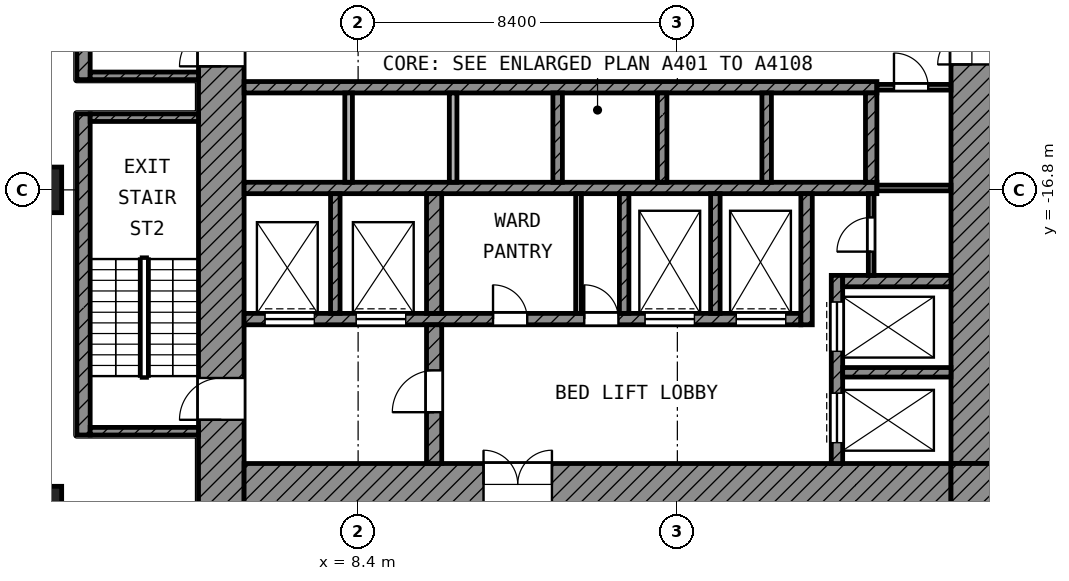
"""IFC4 building model, lengths in metres.
Left out: names, types, materials, properties, quantities, classifications, styles, units other than length and angle.
Written with IfcOpenShell. Run it as: python <this file> out.ifc"""

import sys

from ifc_helpers import new_model, si_unit, direction, frame, frame_2d, origin, origin_2d, place, context, subcontext, project, spatial, rectangle, extrude, element, fill, save


model = new_model("IFC4")
c1 = context("Model", 3, precision=1e-05, world=origin(), true_north=direction((0.0, 1.0)))
c2 = subcontext(c1, "Body", "Model", "MODEL_VIEW")
j1 = project(units=[si_unit("LENGTHUNIT", "METRE"), si_unit("PLANEANGLEUNIT", "RADIAN")], contexts=[c1])
p1 = place(None, origin())
s1 = spatial("IfcSite", under=j1, at=p1, CompositionType="ELEMENT")
p2 = place(p1, origin())
s2 = spatial("IfcBuilding", under=s1, at=p2, CompositionType="ELEMENT")
p3 = place(p2, frame((0.0, 0.0, 51.8)))
s3 = spatial("IfcBuildingStorey", under=s2, at=p3, CompositionType="ELEMENT", Elevation=51.8)
for number, where, z_axis, x_axis in (
    (1, (0.0, -16.8, 0.0), (0.0, 0.0, 1.0), (1.0, 0.0, 0.0)),
    (2, (0.0, -25.2, 0.0), (0.0, 0.0, 1.0), (1.0, 0.0, 0.0)),
):
    element("IfcColumn", number, at=place(p3, frame(where, z_axis=z_axis, x_axis=x_axis)), inside=s3, PredefinedType="COLUMN", context=c2, shape_type="SweptSolid", body=[
        extrude(rectangle(XDim=1.2, YDim=1.2, at=origin_2d()), origin(), (0.0, 0.0, 1.0), 4.2),
    ])
p4 = place(p3, frame((4.8, -25.1, 0.0), z_axis=(0.0, 0.0, 1.0), x_axis=(0.0, 1.0, 0.0)))
e3 = element("IfcWall", 3, at=p4, inside=s3, PredefinedType="SHEAR", context=c2, shape_type="SweptSolid", body=[
    extrude(rectangle(XDim=19.7, YDim=1.2, at=frame_2d((9.85, 0.0))), origin(), (0.0, 0.0, 1.0), 3.9),
])
p5 = place(p4, frame((11.55, 0.0, 0.0)))
e4 = element("IfcOpeningElement", 4, at=p5, cuts=e3, PredefinedType="OPENING", context=c2, shape_type="SweptSolid", body=[
    extrude(rectangle(XDim=1.1, YDim=2.1, at=frame_2d((0.55, 1.05))), frame((0.0, 0.61, 0.0), z_axis=(0.0, -1.0, 0.0), x_axis=(1.0, 0.0, 0.0)), (0.0, 0.0, 1.0), 1.22),
])
p6 = place(p4, frame((2.25, 0.0, 0.0)))
e5 = element("IfcOpeningElement", 5, at=p6, cuts=e3, PredefinedType="OPENING", context=c2, shape_type="SweptSolid", body=[
    extrude(rectangle(XDim=1.1, YDim=2.1, at=frame_2d((0.55, 1.05))), frame((0.0, 0.61, 0.0), z_axis=(0.0, -1.0, 0.0), x_axis=(1.0, 0.0, 0.0)), (0.0, 0.0, 1.0), 1.22),
])
p7 = place(p3, frame((24.55, -24.0, 0.0), z_axis=(0.0, 0.0, 1.0), x_axis=(0.0, 1.0, 0.0)))
e6 = element("IfcWall", 6, at=p7, inside=s3, PredefinedType="SHEAR", context=c2, shape_type="SweptSolid", body=[
    extrude(rectangle(XDim=18.6, YDim=1.1, at=frame_2d((9.3, 0.0))), origin(), (0.0, 0.0, 1.0), 3.9),
])
p8 = place(p7, frame((10.5, 0.0, 0.0)))
e7 = element("IfcOpeningElement", 7, at=p8, cuts=e6, PredefinedType="OPENING", context=c2, shape_type="SweptSolid", body=[
    extrude(rectangle(XDim=1.8, YDim=2.1, at=frame_2d((0.9, 1.05))), frame((0.0, 0.56, 0.0), z_axis=(0.0, -1.0, 0.0), x_axis=(1.0, 0.0, 0.0)), (0.0, 0.0, 1.0), 1.12),
])
p9 = place(p3, frame((5.4, -24.55, 0.0), z_axis=(0.0, 0.0, 1.0), x_axis=(1.0, 0.0, 0.0)))
e8 = element("IfcWall", 8, at=p9, inside=s3, PredefinedType="SHEAR", context=c2, shape_type="SweptSolid", body=[
    extrude(rectangle(XDim=18.6, YDim=1.1, at=frame_2d((9.3, 0.0))), origin(), (0.0, 0.0, 1.0), 3.9),
])
p10 = place(p9, frame((6.3, 0.0, 0.0)))
e9 = element("IfcOpeningElement", 9, at=p10, cuts=e8, PredefinedType="OPENING", context=c2, shape_type="SweptSolid", body=[
    extrude(rectangle(XDim=1.8, YDim=2.1, at=frame_2d((0.9, 1.05))), frame((0.0, 0.56, 0.0), z_axis=(0.0, -1.0, 0.0), x_axis=(1.0, 0.0, 0.0)), (0.0, 0.0, 1.0), 1.12),
])
p11 = place(p3, frame((24.55, -25.1, 0.0), z_axis=(0.0, 0.0, 1.0), x_axis=(0.0, 1.0, 0.0)))
e10 = element("IfcWall", 10, at=p11, inside=s3, PredefinedType="SHEAR", context=c2, shape_type="SweptSolid", body=[
    extrude(rectangle(XDim=1.1, YDim=1.1, at=frame_2d((0.55, 0.0))), origin(), (0.0, 0.0, 1.0), 3.9),
])
for number, where, z_axis, x_axis in (
    (11, (5.4, -14.1, 0.0), (0.0, 0.0, 1.0), (1.0, 0.0, 0.0)),
    (12, (5.4, -16.75, 0.0), (0.0, 0.0, 1.0), (1.0, 0.0, 0.0)),
):
    element("IfcWall", number, at=place(p3, frame(where, z_axis=z_axis, x_axis=x_axis)), inside=s3, PredefinedType="SHEAR", context=c2, shape_type="SweptSolid", body=[
        extrude(rectangle(XDim=16.65, YDim=0.3, at=frame_2d((8.325, 0.0))), origin(), (0.0, 0.0, 1.0), 3.9),
    ])
p12 = place(p3, frame((5.4, -20.2, 0.0), z_axis=(0.0, 0.0, 1.0), x_axis=(1.0, 0.0, 0.0)))
e13 = element("IfcWall", 13, at=p12, inside=s3, PredefinedType="SHEAR", context=c2, shape_type="SweptSolid", body=[
    extrude(rectangle(XDim=14.65, YDim=0.3, at=frame_2d((7.325, 0.0))), origin(), (0.0, 0.0, 1.0), 3.9),
])
p13 = place(p12, frame((10.55, 0.0, 0.0)))
e14 = element("IfcOpeningElement", 14, at=p13, cuts=e13, PredefinedType="OPENING", context=c2, shape_type="SweptSolid", body=[
    extrude(rectangle(XDim=1.3, YDim=2.1, at=frame_2d((0.65, 1.05))), frame((0.0, 0.16, 0.0), z_axis=(0.0, -1.0, 0.0), x_axis=(1.0, 0.0, 0.0)), (0.0, 0.0, 1.0), 0.32),
])
p14 = place(p12, frame((12.95, 0.0, 0.0)))
e15 = element("IfcOpeningElement", 15, at=p14, cuts=e13, PredefinedType="OPENING", context=c2, shape_type="SweptSolid", body=[
    extrude(rectangle(XDim=1.3, YDim=2.1, at=frame_2d((0.65, 1.05))), frame((0.0, 0.16, 0.0), z_axis=(0.0, -1.0, 0.0), x_axis=(1.0, 0.0, 0.0)), (0.0, 0.0, 1.0), 0.32),
])
p15 = place(p12, frame((0.55, 0.0, 0.0)))
e16 = element("IfcOpeningElement", 16, at=p15, cuts=e13, PredefinedType="OPENING", context=c2, shape_type="SweptSolid", body=[
    extrude(rectangle(XDim=1.3, YDim=2.1, at=frame_2d((0.65, 1.05))), frame((0.0, 0.16, 0.0), z_axis=(0.0, -1.0, 0.0), x_axis=(1.0, 0.0, 0.0)), (0.0, 0.0, 1.0), 0.32),
])
p16 = place(p12, frame((2.95, 0.0, 0.0)))
e17 = element("IfcOpeningElement", 17, at=p16, cuts=e13, PredefinedType="OPENING", context=c2, shape_type="SweptSolid", body=[
    extrude(rectangle(XDim=1.3, YDim=2.1, at=frame_2d((0.65, 1.05))), frame((0.0, 0.16, 0.0), z_axis=(0.0, -1.0, 0.0), x_axis=(1.0, 0.0, 0.0)), (0.0, 0.0, 1.0), 0.32),
])
p17 = place(p12, frame((6.55, 0.0, 0.0)))
e18 = element("IfcOpeningElement", 18, at=p17, cuts=e13, PredefinedType="OPENING", context=c2, shape_type="SweptSolid", body=[
    extrude(rectangle(XDim=0.9, YDim=2.1, at=frame_2d((0.45, 1.05))), frame((0.0, 0.16, 0.0), z_axis=(0.0, -1.0, 0.0), x_axis=(1.0, 0.0, 0.0)), (0.0, 0.0, 1.0), 0.32),
])
p18 = place(p12, frame((8.95, 0.0, 0.0)))
e19 = element("IfcOpeningElement", 19, at=p18, cuts=e13, PredefinedType="OPENING", context=c2, shape_type="SweptSolid", body=[
    extrude(rectangle(XDim=0.9, YDim=2.1, at=frame_2d((0.45, 1.05))), frame((0.0, 0.16, 0.0), z_axis=(0.0, -1.0, 0.0), x_axis=(1.0, 0.0, 0.0)), (0.0, 0.0, 1.0), 0.32),
])
p19 = place(p3, frame((10.4, -24.0, 0.0), z_axis=(0.0, 0.0, 1.0), x_axis=(0.0, 1.0, 0.0)))
e20 = element("IfcWall", 20, at=p19, inside=s3, PredefinedType="SHEAR", context=c2, shape_type="SweptSolid", body=[
    extrude(rectangle(XDim=3.65, YDim=0.4, at=frame_2d((1.825, 0.0))), origin(), (0.0, 0.0, 1.0), 3.9),
])
p20 = place(p19, frame((1.35, 0.0, 0.0)))
e21 = element("IfcOpeningElement", 21, at=p20, cuts=e20, PredefinedType="OPENING", context=c2, shape_type="SweptSolid", body=[
    extrude(rectangle(XDim=1.1, YDim=2.1, at=frame_2d((0.55, 1.05))), frame((0.0, 0.21, 0.0), z_axis=(0.0, -1.0, 0.0), x_axis=(1.0, 0.0, 0.0)), (0.0, 0.0, 1.0), 0.42),
])
p21 = place(p3, frame((10.4, -20.05, 0.0), z_axis=(0.0, 0.0, 1.0), x_axis=(0.0, 1.0, 0.0)))
e22 = element("IfcWall", 22, at=p21, inside=s3, PredefinedType="SHEAR", context=c2, shape_type="SweptSolid", body=[
    extrude(rectangle(XDim=3.15, YDim=0.4, at=frame_2d((1.575, 0.0))), origin(), (0.0, 0.0, 1.0), 3.9),
])
p22 = place(p3, frame((20.2, -20.35, 0.0), z_axis=(0.0, 0.0, 1.0), x_axis=(0.0, 1.0, 0.0)))
e23 = element("IfcWall", 23, at=p22, inside=s3, PredefinedType="SHEAR", context=c2, shape_type="SweptSolid", body=[
    extrude(rectangle(XDim=3.45, YDim=0.3, at=frame_2d((1.725, 0.0))), origin(), (0.0, 0.0, 1.0), 3.9),
])
p23 = place(p3, frame((21.9, -16.6, 0.0), z_axis=(0.0, 0.0, 1.0), x_axis=(0.0, 1.0, 0.0)))
e24 = element("IfcWall", 24, at=p23, inside=s3, PredefinedType="SHEAR", context=c2, shape_type="SweptSolid", body=[
    extrude(rectangle(XDim=2.35, YDim=0.3, at=frame_2d((1.175, 0.0))), origin(), (0.0, 0.0, 1.0), 3.9),
])
p24 = place(p3, frame((21.15, -19.2, 0.0), z_axis=(0.0, 0.0, 1.0), x_axis=(1.0, 0.0, 0.0)))
e25 = element("IfcWall", 25, at=p24, inside=s3, PredefinedType="SHEAR", context=c2, shape_type="SweptSolid", body=[
    extrude(rectangle(XDim=2.85, YDim=0.3, at=frame_2d((1.425, 0.0))), origin(), (0.0, 0.0, 1.0), 3.9),
])
p25 = place(p3, frame((21.0, -24.0, 0.0), z_axis=(0.0, 0.0, 1.0), x_axis=(0.0, 1.0, 0.0)))
e26 = element("IfcWall", 26, at=p25, inside=s3, PredefinedType="SHEAR", context=c2, shape_type="SweptSolid", body=[
    extrude(rectangle(XDim=4.95, YDim=0.3, at=frame_2d((2.475, 0.0))), origin(), (0.0, 0.0, 1.0), 3.9),
])
p26 = place(p25, frame((2.95, 0.0, 0.0)))
e27 = element("IfcOpeningElement", 27, at=p26, cuts=e26, PredefinedType="OPENING", context=c2, shape_type="SweptSolid", body=[
    extrude(rectangle(XDim=1.3, YDim=2.1, at=frame_2d((0.65, 1.05))), frame((0.0, 0.16, 0.0), z_axis=(0.0, -1.0, 0.0), x_axis=(1.0, 0.0, 0.0)), (0.0, 0.0, 1.0), 0.32),
])
p27 = place(p25, frame((0.55, 0.0, 0.0)))
e28 = element("IfcOpeningElement", 28, at=p27, cuts=e26, PredefinedType="OPENING", context=c2, shape_type="SweptSolid", body=[
    extrude(rectangle(XDim=1.3, YDim=2.1, at=frame_2d((0.65, 1.05))), frame((0.0, 0.16, 0.0), z_axis=(0.0, -1.0, 0.0), x_axis=(1.0, 0.0, 0.0)), (0.0, 0.0, 1.0), 0.32),
])
p28 = place(p3, frame((21.15, -21.6, 0.0), z_axis=(0.0, 0.0, 1.0), x_axis=(1.0, 0.0, 0.0)))
e29 = element("IfcWall", 29, at=p28, inside=s3, PredefinedType="SHEAR", context=c2, shape_type="SweptSolid", body=[
    extrude(rectangle(XDim=2.85, YDim=0.25, at=frame_2d((1.425, 0.0))), origin(), (0.0, 0.0, 1.0), 3.9),
])
for number, where, z_axis, x_axis in (
    (30, (7.8, -20.05, 0.0), (0.0, 0.0, 1.0), (0.0, 1.0, 0.0)),
    (31, (15.4, -20.05, 0.0), (0.0, 0.0, 1.0), (0.0, 1.0, 0.0)),
    (32, (17.8, -20.05, 0.0), (0.0, 0.0, 1.0), (0.0, 1.0, 0.0)),
):
    element("IfcWall", number, at=place(p3, frame(where, z_axis=z_axis, x_axis=x_axis)), inside=s3, PredefinedType="SHEAR", context=c2, shape_type="SweptSolid", body=[
        extrude(rectangle(XDim=3.15, YDim=0.25, at=frame_2d((1.575, 0.0))), origin(), (0.0, 0.0, 1.0), 3.9),
    ])
for number, where, z_axis, x_axis in (
    (33, (8.15, -16.6, 0.0), (0.0, 0.0, 1.0), (0.0, 1.0, 0.0)),
    (34, (10.9, -16.6, 0.0), (0.0, 0.0, 1.0), (0.0, 1.0, 0.0)),
):
    element("IfcWall", number, at=place(p3, frame(where, z_axis=z_axis, x_axis=x_axis)), inside=s3, PredefinedType="PARTITIONING", context=c2, shape_type="SweptSolid", body=[
        extrude(rectangle(XDim=2.35, YDim=0.2, at=frame_2d((1.175, 0.0))), origin(), (0.0, 0.0, 1.0), 3.9),
    ])
for number, where, z_axis, x_axis in (
    (35, (13.65, -16.6, 0.0), (0.0, 0.0, 1.0), (0.0, 1.0, 0.0)),
    (36, (16.4, -16.6, 0.0), (0.0, 0.0, 1.0), (0.0, 1.0, 0.0)),
    (37, (19.15, -16.6, 0.0), (0.0, 0.0, 1.0), (0.0, 1.0, 0.0)),
):
    element("IfcWall", number, at=place(p3, frame(where, z_axis=z_axis, x_axis=x_axis)), inside=s3, PredefinedType="SHEAR", context=c2, shape_type="SweptSolid", body=[
        extrude(rectangle(XDim=2.35, YDim=0.25, at=frame_2d((1.175, 0.0))), origin(), (0.0, 0.0, 1.0), 3.9),
    ])
p29 = place(p3, frame((21.9, -19.05, 0.0), z_axis=(0.0, 0.0, 1.0), x_axis=(0.0, 1.0, 0.0)))
e38 = element("IfcWall", 38, at=p29, inside=s3, PredefinedType="PARTITIONING", context=c2, shape_type="SweptSolid", body=[
    extrude(rectangle(XDim=2.15, YDim=0.15, at=frame_2d((1.075, 0.0))), origin(), (0.0, 0.0, 1.0), 3.9),
])
p30 = place(p29, frame((0.625, 0.0, 0.0)))
e39 = element("IfcOpeningElement", 39, at=p30, cuts=e38, PredefinedType="OPENING", context=c2, shape_type="SweptSolid", body=[
    extrude(rectangle(XDim=0.9, YDim=2.1, at=frame_2d((0.45, 1.05))), frame((0.0, 0.085, 0.0), z_axis=(0.0, -1.0, 0.0), x_axis=(1.0, 0.0, 0.0)), (0.0, 0.0, 1.0), 0.17),
])
p31 = place(p3, frame((22.05, -16.75, 0.0), z_axis=(0.0, 0.0, 1.0), x_axis=(1.0, 0.0, 0.0)))
e40 = element("IfcWall", 40, at=p31, inside=s3, PredefinedType="PARTITIONING", context=c2, shape_type="SweptSolid", body=[
    extrude(rectangle(XDim=1.95, YDim=0.15, at=frame_2d((0.975, 0.0))), origin(), (0.0, 0.0, 1.0), 3.9),
])
p32 = place(p3, frame((22.05, -14.1, 0.0), z_axis=(0.0, 0.0, 1.0), x_axis=(1.0, 0.0, 0.0)))
e41 = element("IfcWall", 41, at=p32, inside=s3, PredefinedType="PARTITIONING", context=c2, shape_type="SweptSolid", body=[
    extrude(rectangle(XDim=1.95, YDim=0.15, at=frame_2d((0.975, 0.0))), origin(), (0.0, 0.0, 1.0), 3.9),
])
p33 = place(p32, frame((0.45, 0.0, 0.0)))
e42 = element("IfcOpeningElement", 42, at=p33, cuts=e41, PredefinedType="OPENING", context=c2, shape_type="SweptSolid", body=[
    extrude(rectangle(XDim=0.9, YDim=2.1, at=frame_2d((0.45, 1.05))), frame((0.0, 0.085, 0.0), z_axis=(0.0, -1.0, 0.0), x_axis=(1.0, 0.0, 0.0)), (0.0, 0.0, 1.0), 0.17),
])
p34 = place(p3, frame((14.2, -20.05, 0.0), z_axis=(0.0, 0.0, 1.0), x_axis=(0.0, 1.0, 0.0)))
e43 = element("IfcWall", 43, at=p34, inside=s3, PredefinedType="PARTITIONING", context=c2, shape_type="SweptSolid", body=[
    extrude(rectangle(XDim=3.15, YDim=0.15, at=frame_2d((1.575, 0.0))), origin(), (0.0, 0.0, 1.0), 3.9),
])
p35 = place(p3, frame((1.175, -13.9, 0.0), z_axis=(0.0, 0.0, 1.0), x_axis=(0.0, 1.0, 0.0)))
e44 = element("IfcWall", 44, at=p35, inside=s3, PredefinedType="SHEAR", context=c2, shape_type="SweptSolid", body=[
    extrude(rectangle(XDim=8.45, YDim=0.35, at=frame_2d((4.225, 0.0))), origin(), (0.0, 0.0, 1.0), 3.9),
])
p36 = place(p3, frame((1.35, -13.8, 0.0), z_axis=(0.0, 0.0, 1.0), x_axis=(1.0, 0.0, 0.0)))
e45 = element("IfcWall", 45, at=p36, inside=s3, PredefinedType="SHEAR", context=c2, shape_type="SweptSolid", body=[
    extrude(rectangle(XDim=2.85, YDim=0.2, at=frame_2d((1.425, 0.0))), origin(), (0.0, 0.0, 1.0), 3.9),
])
p37 = place(p3, frame((1.175, -23.25, 0.0), z_axis=(0.0, 0.0, 1.0), x_axis=(0.0, 1.0, 0.0)))
e46 = element("IfcWall", 46, at=p37, inside=s3, PredefinedType="SHEAR", context=c2, shape_type="SweptSolid", body=[
    extrude(rectangle(XDim=8.45, YDim=0.35, at=frame_2d((4.225, 0.0))), origin(), (0.0, 0.0, 1.0), 3.9),
])
for number, where, z_axis, x_axis in (
    (47, (1.35, -14.9, 0.0), (0.0, 0.0, 1.0), (1.0, 0.0, 0.0)),
    (48, (1.35, -23.15, 0.0), (0.0, 0.0, 1.0), (1.0, 0.0, 0.0)),
):
    element("IfcWall", number, at=place(p3, frame(where, z_axis=z_axis, x_axis=x_axis)), inside=s3, PredefinedType="SHEAR", context=c2, shape_type="SweptSolid", body=[
        extrude(rectangle(XDim=2.85, YDim=0.2, at=frame_2d((1.425, 0.0))), origin(), (0.0, 0.0, 1.0), 3.9),
    ])
p38 = place(p26, origin())
e49 = element("IfcDoor", 49, at=p38, inside=s3, OperationType="DOUBLE_DOOR_SLIDING", PredefinedType="DOOR", context=c2, shape_type="SweptSolid", body=[
    extrude(rectangle(XDim=1.3, YDim=2.1, at=frame_2d((0.65, 1.05))), frame((0.0, 0.025, 0.0), z_axis=(0.0, -1.0, 0.0), x_axis=(1.0, 0.0, 0.0)), (0.0, 0.0, 1.0), 0.05),
])
fill(e27, e49)
p39 = place(p27, origin())
e50 = element("IfcDoor", 50, at=p39, inside=s3, OperationType="DOUBLE_DOOR_SLIDING", PredefinedType="DOOR", context=c2, shape_type="SweptSolid", body=[
    extrude(rectangle(XDim=1.3, YDim=2.1, at=frame_2d((0.65, 1.05))), frame((0.0, 0.025, 0.0), z_axis=(0.0, -1.0, 0.0), x_axis=(1.0, 0.0, 0.0)), (0.0, 0.0, 1.0), 0.05),
])
fill(e28, e50)
p40 = place(p13, origin())
e51 = element("IfcDoor", 51, at=p40, inside=s3, OperationType="DOUBLE_DOOR_SLIDING", PredefinedType="DOOR", context=c2, shape_type="SweptSolid", body=[
    extrude(rectangle(XDim=1.3, YDim=2.1, at=frame_2d((0.65, 1.05))), frame((0.0, 0.025, 0.0), z_axis=(0.0, -1.0, 0.0), x_axis=(1.0, 0.0, 0.0)), (0.0, 0.0, 1.0), 0.05),
])
fill(e14, e51)
p41 = place(p14, origin())
e52 = element("IfcDoor", 52, at=p41, inside=s3, OperationType="DOUBLE_DOOR_SLIDING", PredefinedType="DOOR", context=c2, shape_type="SweptSolid", body=[
    extrude(rectangle(XDim=1.3, YDim=2.1, at=frame_2d((0.65, 1.05))), frame((0.0, 0.025, 0.0), z_axis=(0.0, -1.0, 0.0), x_axis=(1.0, 0.0, 0.0)), (0.0, 0.0, 1.0), 0.05),
])
fill(e15, e52)
p42 = place(p15, origin())
e53 = element("IfcDoor", 53, at=p42, inside=s3, OperationType="DOUBLE_DOOR_SLIDING", PredefinedType="DOOR", context=c2, shape_type="SweptSolid", body=[
    extrude(rectangle(XDim=1.3, YDim=2.1, at=frame_2d((0.65, 1.05))), frame((0.0, 0.025, 0.0), z_axis=(0.0, -1.0, 0.0), x_axis=(1.0, 0.0, 0.0)), (0.0, 0.0, 1.0), 0.05),
])
fill(e16, e53)
p43 = place(p16, origin())
e54 = element("IfcDoor", 54, at=p43, inside=s3, OperationType="DOUBLE_DOOR_SLIDING", PredefinedType="DOOR", context=c2, shape_type="SweptSolid", body=[
    extrude(rectangle(XDim=1.3, YDim=2.1, at=frame_2d((0.65, 1.05))), frame((0.0, 0.025, 0.0), z_axis=(0.0, -1.0, 0.0), x_axis=(1.0, 0.0, 0.0)), (0.0, 0.0, 1.0), 0.05),
])
fill(e17, e54)
p44 = place(p5, origin())
e55 = element("IfcDoor", 55, at=p44, inside=s3, OperationType="SINGLE_SWING_LEFT", PredefinedType="DOOR", context=c2, shape_type="SweptSolid", body=[
    extrude(rectangle(XDim=1.1, YDim=2.1, at=frame_2d((0.55, 1.05))), frame((0.0, 0.025, 0.0), z_axis=(0.0, -1.0, 0.0), x_axis=(1.0, 0.0, 0.0)), (0.0, 0.0, 1.0), 0.05),
])
fill(e4, e55)
p45 = place(p6, origin())
e56 = element("IfcDoor", 56, at=p45, inside=s3, OperationType="SINGLE_SWING_LEFT", PredefinedType="DOOR", context=c2, shape_type="SweptSolid", body=[
    extrude(rectangle(XDim=1.1, YDim=2.1, at=frame_2d((0.55, 1.05))), frame((0.0, 0.025, 0.0), z_axis=(0.0, -1.0, 0.0), x_axis=(1.0, 0.0, 0.0)), (0.0, 0.0, 1.0), 0.05),
])
fill(e5, e56)
p46 = place(p20, origin())
e57 = element("IfcDoor", 57, at=p46, inside=s3, OperationType="SINGLE_SWING_LEFT", PredefinedType="DOOR", context=c2, shape_type="SweptSolid", body=[
    extrude(rectangle(XDim=1.1, YDim=2.1, at=frame_2d((0.55, 1.05))), frame((0.0, 0.025, 0.0), z_axis=(0.0, -1.0, 0.0), x_axis=(1.0, 0.0, 0.0)), (0.0, 0.0, 1.0), 0.05),
])
fill(e21, e57)
p47 = place(p8, origin())
e58 = element("IfcDoor", 58, at=p47, inside=s3, OperationType="DOUBLE_DOOR_SINGLE_SWING", PredefinedType="DOOR", context=c2, shape_type="SweptSolid", body=[
    extrude(rectangle(XDim=1.8, YDim=2.1, at=frame_2d((0.9, 1.05))), frame((0.0, 0.025, 0.0), z_axis=(0.0, -1.0, 0.0), x_axis=(1.0, 0.0, 0.0)), (0.0, 0.0, 1.0), 0.05),
])
fill(e7, e58)
p48 = place(p10, origin())
e59 = element("IfcDoor", 59, at=p48, inside=s3, OperationType="DOUBLE_DOOR_SINGLE_SWING", PredefinedType="DOOR", context=c2, shape_type="SweptSolid", body=[
    extrude(rectangle(XDim=1.8, YDim=2.1, at=frame_2d((0.9, 1.05))), frame((0.0, 0.025, 0.0), z_axis=(0.0, -1.0, 0.0), x_axis=(1.0, 0.0, 0.0)), (0.0, 0.0, 1.0), 0.05),
])
fill(e9, e59)
p49 = place(p33, origin())
e60 = element("IfcDoor", 60, at=p49, inside=s3, OperationType="SINGLE_SWING_LEFT", PredefinedType="DOOR", context=c2, shape_type="SweptSolid", body=[
    extrude(rectangle(XDim=0.9, YDim=2.1, at=frame_2d((0.45, 1.05))), frame((0.0, 0.025, 0.0), z_axis=(0.0, -1.0, 0.0), x_axis=(1.0, 0.0, 0.0)), (0.0, 0.0, 1.0), 0.05),
])
fill(e42, e60)
p50 = place(p30, origin())
e61 = element("IfcDoor", 61, at=p50, inside=s3, OperationType="SINGLE_SWING_LEFT", PredefinedType="DOOR", context=c2, shape_type="SweptSolid", body=[
    extrude(rectangle(XDim=0.9, YDim=2.1, at=frame_2d((0.45, 1.05))), frame((0.0, 0.025, 0.0), z_axis=(0.0, -1.0, 0.0), x_axis=(1.0, 0.0, 0.0)), (0.0, 0.0, 1.0), 0.05),
])
fill(e39, e61)
p51 = place(p17, origin())
e62 = element("IfcDoor", 62, at=p51, inside=s3, OperationType="SINGLE_SWING_LEFT", PredefinedType="DOOR", context=c2, shape_type="SweptSolid", body=[
    extrude(rectangle(XDim=0.9, YDim=2.1, at=frame_2d((0.45, 1.05))), frame((0.0, 0.025, 0.0), z_axis=(0.0, -1.0, 0.0), x_axis=(1.0, 0.0, 0.0)), (0.0, 0.0, 1.0), 0.05),
])
fill(e18, e62)
p52 = place(p18, origin())
e63 = element("IfcDoor", 63, at=p52, inside=s3, OperationType="SINGLE_SWING_LEFT", PredefinedType="DOOR", context=c2, shape_type="SweptSolid", body=[
    extrude(rectangle(XDim=0.9, YDim=2.1, at=frame_2d((0.45, 1.05))), frame((0.0, 0.025, 0.0), z_axis=(0.0, -1.0, 0.0), x_axis=(1.0, 0.0, 0.0)), (0.0, 0.0, 1.0), 0.05),
])
fill(e19, e63)
save(model, sys.argv[1])
